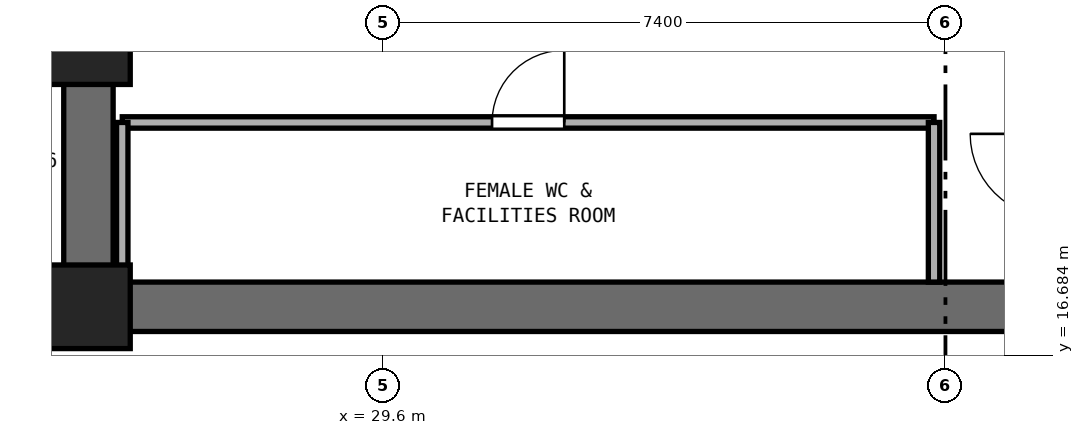
"""IFC4 building model, lengths in metres.
Left out: names, types, materials, properties, quantities, classifications, styles, units other than length and angle.
Written with IfcOpenShell. Run it as: python <this file> out.ifc"""

import sys

from ifc_helpers import new_model, si_unit, direction, frame, frame_2d, origin, origin_2d, place, context, subcontext, project, spatial, rectangle, extrude, element, fill, save


model = new_model("IFC4")
c1 = context("Model", 3, precision=1e-05, world=origin(), true_north=direction((0.0, 1.0)))
c2 = subcontext(c1, "Body", "Model", "MODEL_VIEW")
j1 = project(units=[si_unit("LENGTHUNIT", "METRE"), si_unit("PLANEANGLEUNIT", "RADIAN")], contexts=[c1])
p1 = place(None, origin())
s1 = spatial("IfcSite", under=j1, at=p1, CompositionType="ELEMENT")
p2 = place(p1, origin())
s2 = spatial("IfcBuilding", under=s1, at=p2, CompositionType="ELEMENT")
p3 = place(p2, frame((0.0, 0.0, 36.4)))
s3 = spatial("IfcBuildingStorey", under=s2, at=p3, CompositionType="ELEMENT", Elevation=36.4)
p4 = place(p3, frame((25.4, 17.325, 0.0), z_axis=(0.0, 0.0, 1.0), x_axis=(1.0, 0.0, 0.0)))
e1 = element("IfcWall", 1, at=p4, inside=s3, PredefinedType="SHEAR", context=c2, shape_type="SweptSolid", body=[
    extrude(rectangle(XDim=23.2, YDim=0.65, at=frame_2d((11.6, 0.0))), origin(), (0.0, 0.0, 1.0), 3.525),
])
p5 = place(p3, frame((25.725, 17.65, 0.0), z_axis=(0.0, 0.0, 1.0), x_axis=(0.0, 1.0, 0.0)))
e2 = element("IfcWall", 2, at=p5, inside=s3, PredefinedType="SHEAR", context=c2, shape_type="SweptSolid", body=[
    extrude(rectangle(XDim=15.1, YDim=0.65, at=frame_2d((7.55, 0.0))), origin(), (0.0, 0.0, 1.0), 3.525),
])
p6 = place(p5, frame((6.8, 0.0, 0.0)))
e3 = element("IfcOpeningElement", 3, at=p6, cuts=e2, PredefinedType="OPENING", context=c2, shape_type="SweptSolid", body=[
    extrude(rectangle(XDim=1.5, YDim=2.15, at=frame_2d((0.75, 1.075))), frame((0.0, 0.335, 0.0), z_axis=(0.0, -1.0, 0.0), x_axis=(1.0, 0.0, 0.0)), (0.0, 0.0, 1.0), 0.67),
])
for number, where, z_axis, x_axis in (
    (4, (25.725, 17.325, 0.0), (0.0, 0.0, 1.0), (1.0, 0.0, 0.0)),
    (5, (25.725, 20.8, 0.0), (0.0, 0.0, 1.0), (1.0, 0.0, 0.0)),
):
    element("IfcColumn", number, at=place(p3, frame(where, z_axis=z_axis, x_axis=x_axis)), inside=s3, PredefinedType="PILASTER", context=c2, shape_type="SweptSolid", body=[
        extrude(rectangle(XDim=1.1, YDim=1.1, at=origin_2d()), origin(), (0.0, 0.0, 1.0), 3.8),
    ])
p7 = place(p3, frame((26.17, 19.75, 0.0), z_axis=(0.0, 0.0, 1.0), x_axis=(1.0, 0.0, 0.0)))
e6 = element("IfcWall", 6, at=p7, inside=s3, PredefinedType="PARTITIONING", context=c2, shape_type="SweptSolid", body=[
    extrude(rectangle(XDim=10.68, YDim=0.15, at=frame_2d((5.34, 0.0))), origin(), (0.0, 0.0, 1.0), 3.525),
])
p8 = place(p7, frame((4.865, 0.0, 0.0)))
e7 = element("IfcOpeningElement", 7, at=p8, cuts=e6, PredefinedType="OPENING", context=c2, shape_type="SweptSolid", body=[
    extrude(rectangle(XDim=0.95, YDim=2.1, at=frame_2d((0.475, 1.05))), frame((0.0, 0.085, 0.0), z_axis=(0.0, -1.0, 0.0), x_axis=(1.0, 0.0, 0.0)), (0.0, 0.0, 1.0), 0.17),
])
for number, where, z_axis, x_axis in (
    (8, (26.17, 17.65, 0.0), (0.0, 0.0, 1.0), (0.0, 1.0, 0.0)),
    (9, (36.85, 17.65, 0.0), (0.0, 0.0, 1.0), (0.0, 1.0, 0.0)),
):
    element("IfcWall", number, at=place(p3, frame(where, z_axis=z_axis, x_axis=x_axis)), inside=s3, PredefinedType="PARTITIONING", context=c2, shape_type="SweptSolid", body=[
        extrude(rectangle(XDim=2.1, YDim=0.15, at=frame_2d((1.05, 0.0))), origin(), (0.0, 0.0, 1.0), 3.525),
    ])
p9 = place(p8, origin())
e10 = element("IfcDoor", 10, at=p9, inside=s3, OperationType="SINGLE_SWING_RIGHT", PredefinedType="DOOR", context=c2, shape_type="SweptSolid", body=[
    extrude(rectangle(XDim=0.95, YDim=2.1, at=frame_2d((0.475, 1.05))), frame((0.0, 0.025, 0.0), z_axis=(0.0, -1.0, 0.0), x_axis=(1.0, 0.0, 0.0)), (0.0, 0.0, 1.0), 0.05),
])
fill(e7, e10)
save(model, sys.argv[1])
